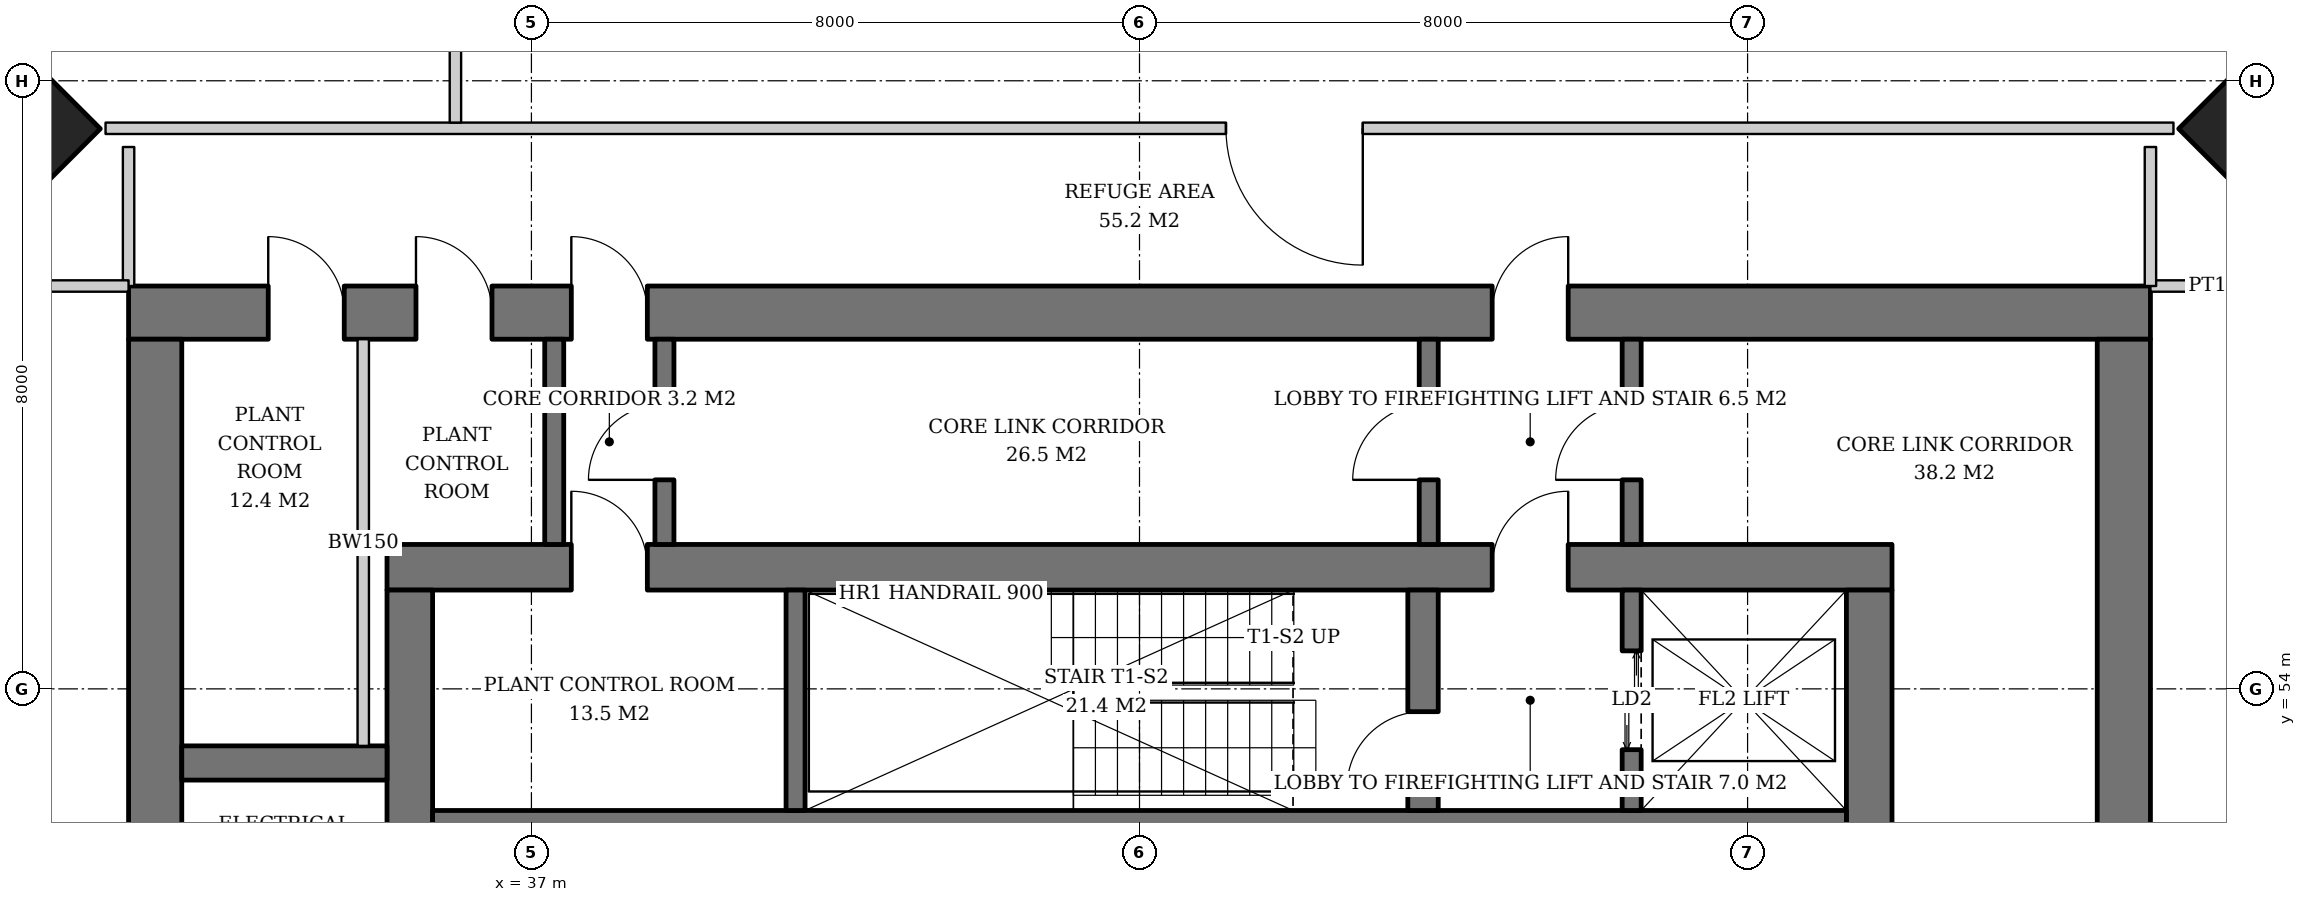
"""IFC4 building model, lengths in metres.
Left out: names, types, materials, properties, quantities, classifications, styles, units other than length and angle.
Written with IfcOpenShell. Run it as: python <this file> out.ifc"""

import sys

from ifc_helpers import new_model, si_unit, direction, frame, frame_2d, origin, origin_2d, place, context, subcontext, project, spatial, rectangle, extrude, element, fill, save


model = new_model("IFC4")
c1 = context("Model", 3, precision=1e-05, world=origin(), true_north=direction((0.0, 1.0)))
c2 = subcontext(c1, "Body", "Model", "MODEL_VIEW")
j1 = project(units=[si_unit("LENGTHUNIT", "METRE"), si_unit("PLANEANGLEUNIT", "RADIAN")], contexts=[c1])
p1 = place(None, origin())
s1 = spatial("IfcSite", under=j1, at=p1, CompositionType="ELEMENT")
p2 = place(p1, origin())
s2 = spatial("IfcBuilding", under=s1, at=p2, CompositionType="ELEMENT")
p3 = place(p2, frame((0.0, 0.0, 161.6)))
s3 = spatial("IfcBuildingStorey", under=s2, at=p3, CompositionType="ELEMENT", Elevation=161.6)
for number, where, z_axis, x_axis in (
    (1, (60.407, 61.407, 0.0), (-0.032, -0.032, 0.999), (0.707, -0.707, 0.0)),
    (2, (29.593, 61.407, 0.0), (0.032, -0.032, 0.999), (0.707, 0.707, 0.0)),
):
    element("IfcColumn", number, at=place(p3, frame(where, z_axis=z_axis, x_axis=x_axis)), inside=s3, PredefinedType="COLUMN", context=c2, shape_type="SweptSolid", body=[
        extrude(rectangle(XDim=2.4, YDim=2.4, at=origin_2d()), origin(), (0.0, 0.0, 1.0), 3.804),
    ])
p4 = place(p3, frame((35.1, 55.6, 0.0), z_axis=(0.0, 0.0, 1.0), x_axis=(1.0, 0.0, 0.0)))
e3 = element("IfcWall", 3, at=p4, inside=s3, PredefinedType="SHEAR", context=c2, shape_type="SweptSolid", body=[
    extrude(rectangle(XDim=19.8, YDim=0.6, at=frame_2d((9.9, 0.0))), origin(), (0.0, 0.0, 1.0), 3.8),
])
p5 = place(p4, frame((14.54, 0.0, 0.0)))
e4 = element("IfcOpeningElement", 4, at=p5, cuts=e3, PredefinedType="OPENING", context=c2, shape_type="SweptSolid", body=[
    extrude(rectangle(XDim=1.0, YDim=2.1, at=frame_2d((0.5, 1.05))), frame((0.0, 0.31, 0.0), z_axis=(0.0, -1.0, 0.0), x_axis=(1.0, 0.0, 0.0)), (0.0, 0.0, 1.0), 0.62),
])
p6 = place(p4, frame((2.425, 0.0, 0.0)))
e5 = element("IfcOpeningElement", 5, at=p6, cuts=e3, PredefinedType="OPENING", context=c2, shape_type="SweptSolid", body=[
    extrude(rectangle(XDim=1.0, YDim=2.1, at=frame_2d((0.5, 1.05))), frame((0.0, 0.31, 0.0), z_axis=(0.0, -1.0, 0.0), x_axis=(1.0, 0.0, 0.0)), (0.0, 0.0, 1.0), 0.62),
])
p7 = place(p3, frame((35.4, 36.7, 0.0), z_axis=(0.0, 0.0, 1.0), x_axis=(0.0, 1.0, 0.0)))
e6 = element("IfcWall", 6, at=p7, inside=s3, PredefinedType="SHEAR", context=c2, shape_type="SweptSolid", body=[
    extrude(rectangle(XDim=18.6, YDim=0.6, at=frame_2d((9.3, 0.0))), origin(), (0.0, 0.0, 1.0), 3.8),
])
p8 = place(p7, frame((8.4, 0.0, 0.0)))
e7 = element("IfcOpeningElement", 7, at=p8, cuts=e6, PredefinedType="OPENING", context=c2, shape_type="SweptSolid", body=[
    extrude(rectangle(XDim=1.8, YDim=2.4, at=frame_2d((0.9, 1.2))), frame((0.0, 0.31, 0.0), z_axis=(0.0, -1.0, 0.0), x_axis=(1.0, 0.0, 0.0)), (0.0, 0.0, 1.0), 0.62),
])
p9 = place(p3, frame((54.6, 36.7, 0.0), z_axis=(0.0, 0.0, 1.0), x_axis=(0.0, 1.0, 0.0)))
e8 = element("IfcWall", 8, at=p9, inside=s3, PredefinedType="SHEAR", context=c2, shape_type="SweptSolid", body=[
    extrude(rectangle(XDim=18.6, YDim=0.6, at=frame_2d((9.3, 0.0))), origin(), (0.0, 0.0, 1.0), 3.8),
])
p10 = place(p9, frame((8.4, 0.0, 0.0)))
e9 = element("IfcOpeningElement", 9, at=p10, cuts=e8, PredefinedType="OPENING", context=c2, shape_type="SweptSolid", body=[
    extrude(rectangle(XDim=1.8, YDim=2.4, at=frame_2d((0.9, 1.2))), frame((0.0, 0.31, 0.0), z_axis=(0.0, -1.0, 0.0), x_axis=(1.0, 0.0, 0.0)), (0.0, 0.0, 1.0), 0.62),
])
p11 = place(p3, frame((31.7, 58.95, 0.0), z_axis=(0.0, 0.0, 1.0), x_axis=(1.0, 0.0, 0.0)))
e10 = element("IfcWall", 10, at=p11, inside=s3, PredefinedType="SHEAR", context=c2, shape_type="SweptSolid", body=[
    extrude(rectangle(XDim=26.6, YDim=0.7, at=frame_2d((13.3, 0.0))), origin(), (0.0, 0.0, 1.0), 3.8),
])
p12 = place(p11, frame((17.94, 0.0, 0.0)))
e11 = element("IfcOpeningElement", 11, at=p12, cuts=e10, PredefinedType="OPENING", context=c2, shape_type="SweptSolid", body=[
    extrude(rectangle(XDim=1.0, YDim=2.1, at=frame_2d((0.5, 1.05))), frame((0.0, 0.36, 0.0), z_axis=(0.0, -1.0, 0.0), x_axis=(1.0, 0.0, 0.0)), (0.0, 0.0, 1.0), 0.72),
])
p13 = place(p11, frame((5.825, 0.0, 0.0)))
e12 = element("IfcOpeningElement", 12, at=p13, cuts=e10, PredefinedType="OPENING", context=c2, shape_type="SweptSolid", body=[
    extrude(rectangle(XDim=1.0, YDim=2.1, at=frame_2d((0.5, 1.05))), frame((0.0, 0.36, 0.0), z_axis=(0.0, -1.0, 0.0), x_axis=(1.0, 0.0, 0.0)), (0.0, 0.0, 1.0), 0.72),
])
p14 = place(p11, frame((1.837, 0.0, 0.0)))
e13 = element("IfcOpeningElement", 13, at=p14, cuts=e10, PredefinedType="OPENING", context=c2, shape_type="SweptSolid", body=[
    extrude(rectangle(XDim=1.0, YDim=2.1, at=frame_2d((0.5, 1.05))), frame((0.0, 0.36, 0.0), z_axis=(0.0, -1.0, 0.0), x_axis=(1.0, 0.0, 0.0)), (0.0, 0.0, 1.0), 0.72),
])
p15 = place(p11, frame((3.781, 0.0, 0.0)))
e14 = element("IfcOpeningElement", 14, at=p15, cuts=e10, PredefinedType="OPENING", context=c2, shape_type="SweptSolid", body=[
    extrude(rectangle(XDim=1.0, YDim=2.1, at=frame_2d((0.5, 1.05))), frame((0.0, 0.36, 0.0), z_axis=(0.0, -1.0, 0.0), x_axis=(1.0, 0.0, 0.0)), (0.0, 0.0, 1.0), 0.72),
])
p16 = place(p3, frame((32.05, 33.4, 0.0), z_axis=(0.0, 0.0, 1.0), x_axis=(0.0, 1.0, 0.0)))
e15 = element("IfcWall", 15, at=p16, inside=s3, PredefinedType="SHEAR", context=c2, shape_type="SweptSolid", body=[
    extrude(rectangle(XDim=25.2, YDim=0.7, at=frame_2d((12.6, 0.0))), origin(), (0.0, 0.0, 1.0), 3.8),
])
p17 = place(p16, frame((11.7, 0.0, 0.0)))
e16 = element("IfcOpeningElement", 16, at=p17, cuts=e15, PredefinedType="OPENING", context=c2, shape_type="SweptSolid", body=[
    extrude(rectangle(XDim=1.8, YDim=2.4, at=frame_2d((0.9, 1.2))), frame((0.0, 0.36, 0.0), z_axis=(0.0, -1.0, 0.0), x_axis=(1.0, 0.0, 0.0)), (0.0, 0.0, 1.0), 0.72),
])
p18 = place(p16, frame((3.55, 0.0, 0.0)))
e17 = element("IfcOpeningElement", 17, at=p18, cuts=e15, PredefinedType="OPENING", context=c2, shape_type="SweptSolid", body=[
    extrude(rectangle(XDim=1.0, YDim=2.1, at=frame_2d((0.5, 1.05))), frame((0.0, 0.36, 0.0), z_axis=(0.0, -1.0, 0.0), x_axis=(1.0, 0.0, 0.0)), (0.0, 0.0, 1.0), 0.72),
])
p19 = place(p16, frame((6.4, 0.0, 0.0)))
e18 = element("IfcOpeningElement", 18, at=p19, cuts=e15, PredefinedType="OPENING", context=c2, shape_type="SweptSolid", body=[
    extrude(rectangle(XDim=1.0, YDim=2.1, at=frame_2d((0.5, 1.05))), frame((0.0, 0.36, 0.0), z_axis=(0.0, -1.0, 0.0), x_axis=(1.0, 0.0, 0.0)), (0.0, 0.0, 1.0), 0.72),
])
p20 = place(p16, frame((9.1, 0.0, 0.0)))
e19 = element("IfcOpeningElement", 19, at=p20, cuts=e15, PredefinedType="OPENING", context=c2, shape_type="SweptSolid", body=[
    extrude(rectangle(XDim=1.0, YDim=2.1, at=frame_2d((0.5, 1.05))), frame((0.0, 0.36, 0.0), z_axis=(0.0, -1.0, 0.0), x_axis=(1.0, 0.0, 0.0)), (0.0, 0.0, 1.0), 0.72),
])
p21 = place(p16, frame((15.1, 0.0, 0.0)))
e20 = element("IfcOpeningElement", 20, at=p21, cuts=e15, PredefinedType="OPENING", context=c2, shape_type="SweptSolid", body=[
    extrude(rectangle(XDim=1.0, YDim=2.1, at=frame_2d((0.5, 1.05))), frame((0.0, 0.36, 0.0), z_axis=(0.0, -1.0, 0.0), x_axis=(1.0, 0.0, 0.0)), (0.0, 0.0, 1.0), 0.72),
])
p22 = place(p16, frame((17.75, 0.0, 0.0)))
e21 = element("IfcOpeningElement", 21, at=p22, cuts=e15, PredefinedType="OPENING", context=c2, shape_type="SweptSolid", body=[
    extrude(rectangle(XDim=1.0, YDim=2.1, at=frame_2d((0.5, 1.05))), frame((0.0, 0.36, 0.0), z_axis=(0.0, -1.0, 0.0), x_axis=(1.0, 0.0, 0.0)), (0.0, 0.0, 1.0), 0.72),
])
p23 = place(p3, frame((57.95, 33.4, 0.0), z_axis=(0.0, 0.0, 1.0), x_axis=(0.0, 1.0, 0.0)))
e22 = element("IfcWall", 22, at=p23, inside=s3, PredefinedType="SHEAR", context=c2, shape_type="SweptSolid", body=[
    extrude(rectangle(XDim=25.2, YDim=0.7, at=frame_2d((12.6, 0.0))), origin(), (0.0, 0.0, 1.0), 3.8),
])
p24 = place(p23, frame((11.7, 0.0, 0.0)))
e23 = element("IfcOpeningElement", 23, at=p24, cuts=e22, PredefinedType="OPENING", context=c2, shape_type="SweptSolid", body=[
    extrude(rectangle(XDim=1.8, YDim=2.4, at=frame_2d((0.9, 1.2))), frame((0.0, 0.36, 0.0), z_axis=(0.0, -1.0, 0.0), x_axis=(1.0, 0.0, 0.0)), (0.0, 0.0, 1.0), 0.72),
])
p25 = place(p3, frame((35.7, 52.2, 0.0), z_axis=(0.0, 0.0, 1.0), x_axis=(1.0, 0.0, 0.0)))
e24 = element("IfcWall", 24, at=p25, inside=s3, PredefinedType="SHEAR", context=c2, shape_type="SweptSolid", body=[
    extrude(rectangle(XDim=18.6, YDim=0.4, at=frame_2d((9.3, 0.0))), origin(), (0.0, 0.0, 1.0), 3.8),
])
p26 = place(p3, frame((48.73, 52.4, 0.0), z_axis=(0.0, 0.0, 1.0), x_axis=(0.0, 1.0, 0.0)))
e25 = element("IfcWall", 25, at=p26, inside=s3, PredefinedType="SHEAR", context=c2, shape_type="SweptSolid", body=[
    extrude(rectangle(XDim=2.9, YDim=0.4, at=frame_2d((1.45, 0.0))), origin(), (0.0, 0.0, 1.0), 3.8),
])
p27 = place(p26, frame((0.3, 0.0, 0.0)))
e26 = element("IfcOpeningElement", 26, at=p27, cuts=e25, PredefinedType="OPENING", context=c2, shape_type="SweptSolid", body=[
    extrude(rectangle(XDim=1.0, YDim=2.1, at=frame_2d((0.5, 1.05))), frame((0.0, 0.21, 0.0), z_axis=(0.0, -1.0, 0.0), x_axis=(1.0, 0.0, 0.0)), (0.0, 0.0, 1.0), 0.42),
])
p28 = place(p3, frame((40.475, 52.4, 0.0), z_axis=(0.0, 0.0, 1.0), x_axis=(0.0, 1.0, 0.0)))
e27 = element("IfcWall", 27, at=p28, inside=s3, PredefinedType="SHEAR", context=c2, shape_type="SweptSolid", body=[
    extrude(rectangle(XDim=2.9, YDim=0.25, at=frame_2d((1.45, 0.0))), origin(), (0.0, 0.0, 1.0), 3.8),
])
p29 = place(p3, frame((51.475, 52.4, 0.0), z_axis=(0.0, 0.0, 1.0), x_axis=(0.0, 1.0, 0.0)))
e28 = element("IfcWall", 28, at=p29, inside=s3, PredefinedType="SHEAR", context=c2, shape_type="SweptSolid", body=[
    extrude(rectangle(XDim=2.9, YDim=0.25, at=frame_2d((1.45, 0.0))), origin(), (0.0, 0.0, 1.0), 3.8),
])
p30 = place(p29, frame((0.8, 0.0, 0.0)))
e29 = element("IfcOpeningElement", 29, at=p30, cuts=e28, PredefinedType="OPENING", context=c2, shape_type="SweptSolid", body=[
    extrude(rectangle(XDim=1.3, YDim=2.2, at=frame_2d((0.65, 1.1))), frame((0.0, 0.135, 0.0), z_axis=(0.0, -1.0, 0.0), x_axis=(1.0, 0.0, 0.0)), (0.0, 0.0, 1.0), 0.27),
])
p31 = place(p3, frame((32.4, 53.025, 0.0), z_axis=(0.0, 0.0, 1.0), x_axis=(1.0, 0.0, 0.0)))
e30 = element("IfcWall", 30, at=p31, inside=s3, PredefinedType="SHEAR", context=c2, shape_type="SweptSolid", body=[
    extrude(rectangle(XDim=2.7, YDim=0.45, at=frame_2d((1.35, 0.0))), origin(), (0.0, 0.0, 1.0), 3.8),
])
p32 = place(p3, frame((48.805, 55.9, 0.0), z_axis=(0.0, 0.0, 1.0), x_axis=(0.0, 1.0, 0.0)))
e31 = element("IfcWall", 31, at=p32, inside=s3, PredefinedType="SOLIDWALL", context=c2, shape_type="SweptSolid", body=[
    extrude(rectangle(XDim=2.7, YDim=0.25, at=frame_2d((1.35, 0.0))), origin(), (0.0, 0.0, 1.0), 3.2),
])
p33 = place(p32, frame((0.85, 0.0, 0.0)))
e32 = element("IfcOpeningElement", 32, at=p33, cuts=e31, PredefinedType="OPENING", context=c2, shape_type="SweptSolid", body=[
    extrude(rectangle(XDim=1.0, YDim=2.1, at=frame_2d((0.5, 1.05))), frame((0.0, 0.135, 0.0), z_axis=(0.0, -1.0, 0.0), x_axis=(1.0, 0.0, 0.0)), (0.0, 0.0, 1.0), 0.27),
])
p34 = place(p3, frame((51.475, 55.9, 0.0), z_axis=(0.0, 0.0, 1.0), x_axis=(0.0, 1.0, 0.0)))
e33 = element("IfcWall", 33, at=p34, inside=s3, PredefinedType="SOLIDWALL", context=c2, shape_type="SweptSolid", body=[
    extrude(rectangle(XDim=2.7, YDim=0.25, at=frame_2d((1.35, 0.0))), origin(), (0.0, 0.0, 1.0), 3.2),
])
p35 = place(p34, frame((0.85, 0.0, 0.0)))
e34 = element("IfcOpeningElement", 34, at=p35, cuts=e33, PredefinedType="OPENING", context=c2, shape_type="SweptSolid", body=[
    extrude(rectangle(XDim=1.0, YDim=2.1, at=frame_2d((0.5, 1.05))), frame((0.0, 0.135, 0.0), z_axis=(0.0, -1.0, 0.0), x_axis=(1.0, 0.0, 0.0)), (0.0, 0.0, 1.0), 0.27),
])
p36 = place(p3, frame((37.3, 55.9, 0.0), z_axis=(0.0, 0.0, 1.0), x_axis=(0.0, 1.0, 0.0)))
e35 = element("IfcWall", 35, at=p36, inside=s3, PredefinedType="SOLIDWALL", context=c2, shape_type="SweptSolid", body=[
    extrude(rectangle(XDim=2.7, YDim=0.25, at=frame_2d((1.35, 0.0))), origin(), (0.0, 0.0, 1.0), 3.2),
])
p37 = place(p3, frame((38.75, 55.9, 0.0), z_axis=(0.0, 0.0, 1.0), x_axis=(0.0, 1.0, 0.0)))
e36 = element("IfcWall", 36, at=p37, inside=s3, PredefinedType="SOLIDWALL", context=c2, shape_type="SweptSolid", body=[
    extrude(rectangle(XDim=2.7, YDim=0.25, at=frame_2d((1.35, 0.0))), origin(), (0.0, 0.0, 1.0), 3.2),
])
p38 = place(p37, frame((0.85, 0.0, 0.0)))
e37 = element("IfcOpeningElement", 37, at=p38, cuts=e36, PredefinedType="OPENING", context=c2, shape_type="SweptSolid", body=[
    extrude(rectangle(XDim=1.0, YDim=2.1, at=frame_2d((0.5, 1.05))), frame((0.0, 0.135, 0.0), z_axis=(0.0, -1.0, 0.0), x_axis=(1.0, 0.0, 0.0)), (0.0, 0.0, 1.0), 0.27),
])
p39 = place(p3, frame((34.788, 53.25, 0.0), z_axis=(0.0, 0.0, 1.0), x_axis=(0.0, 1.0, 0.0)))
e38 = element("IfcWall", 38, at=p39, inside=s3, PredefinedType="SOLIDWALL", context=c2, shape_type="SweptSolid", body=[
    extrude(rectangle(XDim=5.35, YDim=0.15, at=frame_2d((2.675, 0.0))), origin(), (0.0, 0.0, 1.0), 3.2),
])
for number, where, z_axis, x_axis in (
    (39, (58.3, 59.3, 0.0), (0.0, 0.0, 1.0), (1.0, 0.0, 0.0)),
    (40, (31.7, 59.3, 0.0), (0.0, 0.0, 1.0), (0.0, 1.0, 0.0)),
    (41, (58.3, 59.3, 0.0), (0.0, 0.0, 1.0), (0.0, 1.0, 0.0)),
):
    element("IfcWall", number, at=place(p3, frame(where, z_axis=z_axis, x_axis=x_axis)), inside=s3, PredefinedType="PARTITIONING", context=c2, shape_type="SweptSolid", body=[
        extrude(rectangle(XDim=1.829, YDim=0.15, at=frame_2d((0.915, 0.0))), origin(), (0.0, 0.0, 1.0), 3.6),
    ])
p40 = place(p3, frame((58.603, 61.375, 0.0), z_axis=(0.0, 0.0, 1.0), x_axis=(-1.0, 0.0, 0.0)))
e42 = element("IfcWall", 42, at=p40, inside=s3, PredefinedType="PARTITIONING", context=c2, shape_type="SweptSolid", body=[
    extrude(rectangle(XDim=27.206, YDim=0.15, at=frame_2d((13.603, 0.0))), origin(), (0.0, 0.0, 1.0), 2.83),
])
p41 = place(p40, frame((10.666, 0.0, 0.0)))
e43 = element("IfcOpeningElement", 43, at=p41, cuts=e42, PredefinedType="OPENING", context=c2, shape_type="SweptSolid", body=[
    extrude(rectangle(XDim=1.8, YDim=2.4, at=frame_2d((0.9, 1.2))), frame((0.0, 0.085, 0.0), z_axis=(0.0, -1.0, 0.0), x_axis=(1.0, 0.0, 0.0)), (0.0, 0.0, 1.0), 0.17),
])
p42 = place(p3, frame((36.0, 61.45, 0.0), z_axis=(0.0, 0.0, 1.0), x_axis=(0.0, 1.0, 0.0)))
e44 = element("IfcWall", 44, at=p42, inside=s3, PredefinedType="PARTITIONING", context=c2, shape_type="SweptSolid", body=[
    extrude(rectangle(XDim=5.59, YDim=0.15, at=frame_2d((2.795, 0.0))), origin(), (0.0, 0.0, 1.0), 3.6),
])
p43 = place(p3, frame((31.7, 59.3, 0.0), z_axis=(0.0, 0.0, 1.0), x_axis=(-1.0, 0.0, 0.0)))
e45 = element("IfcWall", 45, at=p43, inside=s3, PredefinedType="PARTITIONING", context=c2, shape_type="SweptSolid", body=[
    extrude(rectangle(XDim=1.829, YDim=0.15, at=frame_2d((0.915, 0.0))), origin(), (0.0, 0.0, 1.0), 3.6),
])
p44 = place(p30, origin())
e46 = element("IfcDoor", 46, at=p44, inside=s3, OperationType="DOUBLE_DOOR_SLIDING", PredefinedType="DOOR", context=c2, shape_type="SweptSolid", body=[
    extrude(rectangle(XDim=1.3, YDim=2.2, at=frame_2d((0.65, 1.1))), frame((0.0, 0.025, 0.0), z_axis=(0.0, -1.0, 0.0), x_axis=(1.0, 0.0, 0.0)), (0.0, 0.0, 1.0), 0.05),
])
fill(e29, e46)
p45 = place(p33, origin())
e47 = element("IfcDoor", 47, at=p45, inside=s3, OperationType="SINGLE_SWING_LEFT", PredefinedType="DOOR", context=c2, shape_type="SweptSolid", body=[
    extrude(rectangle(XDim=1.0, YDim=2.1, at=frame_2d((0.5, 1.05))), frame((0.0, 0.025, 0.0), z_axis=(0.0, -1.0, 0.0), x_axis=(1.0, 0.0, 0.0)), (0.0, 0.0, 1.0), 0.05),
])
fill(e32, e47)
p46 = place(p35, origin())
e48 = element("IfcDoor", 48, at=p46, inside=s3, OperationType="SINGLE_SWING_LEFT", PredefinedType="DOOR", context=c2, shape_type="SweptSolid", body=[
    extrude(rectangle(XDim=1.0, YDim=2.1, at=frame_2d((0.5, 1.05))), frame((0.0, 0.025, 0.0), z_axis=(0.0, -1.0, 0.0), x_axis=(1.0, 0.0, 0.0)), (0.0, 0.0, 1.0), 0.05),
])
fill(e34, e48)
p47 = place(p38, origin())
e49 = element("IfcDoor", 49, at=p47, inside=s3, OperationType="SINGLE_SWING_LEFT", PredefinedType="DOOR", context=c2, shape_type="SweptSolid", body=[
    extrude(rectangle(XDim=1.0, YDim=2.1, at=frame_2d((0.5, 1.05))), frame((0.0, 0.025, 0.0), z_axis=(0.0, -1.0, 0.0), x_axis=(1.0, 0.0, 0.0)), (0.0, 0.0, 1.0), 0.05),
])
fill(e37, e49)
p48 = place(p27, origin())
e50 = element("IfcDoor", 50, at=p48, inside=s3, OperationType="SINGLE_SWING_LEFT", PredefinedType="DOOR", context=c2, shape_type="SweptSolid", body=[
    extrude(rectangle(XDim=1.0, YDim=2.1, at=frame_2d((0.5, 1.05))), frame((0.0, 0.025, 0.0), z_axis=(0.0, -1.0, 0.0), x_axis=(1.0, 0.0, 0.0)), (0.0, 0.0, 1.0), 0.05),
])
fill(e26, e50)
p49 = place(p5, origin())
e51 = element("IfcDoor", 51, at=p49, inside=s3, OperationType="SINGLE_SWING_RIGHT", PredefinedType="DOOR", context=c2, shape_type="SweptSolid", body=[
    extrude(rectangle(XDim=1.0, YDim=2.1, at=frame_2d((0.5, 1.05))), frame((0.0, 0.025, 0.0), z_axis=(0.0, -1.0, 0.0), x_axis=(1.0, 0.0, 0.0)), (0.0, 0.0, 1.0), 0.05),
])
fill(e4, e51)
p50 = place(p12, origin())
e52 = element("IfcDoor", 52, at=p50, inside=s3, OperationType="SINGLE_SWING_RIGHT", PredefinedType="DOOR", context=c2, shape_type="SweptSolid", body=[
    extrude(rectangle(XDim=1.0, YDim=2.1, at=frame_2d((0.5, 1.05))), frame((0.0, 0.025, 0.0), z_axis=(0.0, -1.0, 0.0), x_axis=(1.0, 0.0, 0.0)), (0.0, 0.0, 1.0), 0.05),
])
fill(e11, e52)
p51 = place(p13, origin())
e53 = element("IfcDoor", 53, at=p51, inside=s3, OperationType="SINGLE_SWING_LEFT", PredefinedType="DOOR", context=c2, shape_type="SweptSolid", body=[
    extrude(rectangle(XDim=1.0, YDim=2.1, at=frame_2d((0.5, 1.05))), frame((0.0, 0.025, 0.0), z_axis=(0.0, -1.0, 0.0), x_axis=(1.0, 0.0, 0.0)), (0.0, 0.0, 1.0), 0.05),
])
fill(e12, e53)
p52 = place(p6, origin())
e54 = element("IfcDoor", 54, at=p52, inside=s3, OperationType="SINGLE_SWING_LEFT", PredefinedType="DOOR", context=c2, shape_type="SweptSolid", body=[
    extrude(rectangle(XDim=1.0, YDim=2.1, at=frame_2d((0.5, 1.05))), frame((0.0, -0.24, 0.0), z_axis=(0.0, -1.0, 0.0), x_axis=(1.0, 0.0, 0.0)), (0.0, 0.0, 1.0), 0.05),
])
fill(e5, e54)
p53 = place(p14, origin())
e55 = element("IfcDoor", 55, at=p53, inside=s3, OperationType="SINGLE_SWING_LEFT", PredefinedType="DOOR", context=c2, shape_type="SweptSolid", body=[
    extrude(rectangle(XDim=1.0, YDim=2.1, at=frame_2d((0.5, 1.05))), frame((0.0, -0.29, 0.0), z_axis=(0.0, -1.0, 0.0), x_axis=(1.0, 0.0, 0.0)), (0.0, 0.0, 1.0), 0.05),
])
fill(e13, e55)
p54 = place(p15, origin())
e56 = element("IfcDoor", 56, at=p54, inside=s3, OperationType="SINGLE_SWING_LEFT", PredefinedType="DOOR", context=c2, shape_type="SweptSolid", body=[
    extrude(rectangle(XDim=1.0, YDim=2.1, at=frame_2d((0.5, 1.05))), frame((0.0, -0.29, 0.0), z_axis=(0.0, -1.0, 0.0), x_axis=(1.0, 0.0, 0.0)), (0.0, 0.0, 1.0), 0.05),
])
fill(e14, e56)
p55 = place(p41, origin())
e57 = element("IfcDoor", 57, at=p55, inside=s3, OperationType="DOUBLE_DOOR_SINGLE_SWING", PredefinedType="DOOR", context=c2, shape_type="SweptSolid", body=[
    extrude(rectangle(XDim=1.8, YDim=2.4, at=frame_2d((0.9, 1.2))), frame((0.0, 0.025, 0.0), z_axis=(0.0, -1.0, 0.0), x_axis=(1.0, 0.0, 0.0)), (0.0, 0.0, 1.0), 0.05),
])
fill(e43, e57)
save(model, sys.argv[1])
